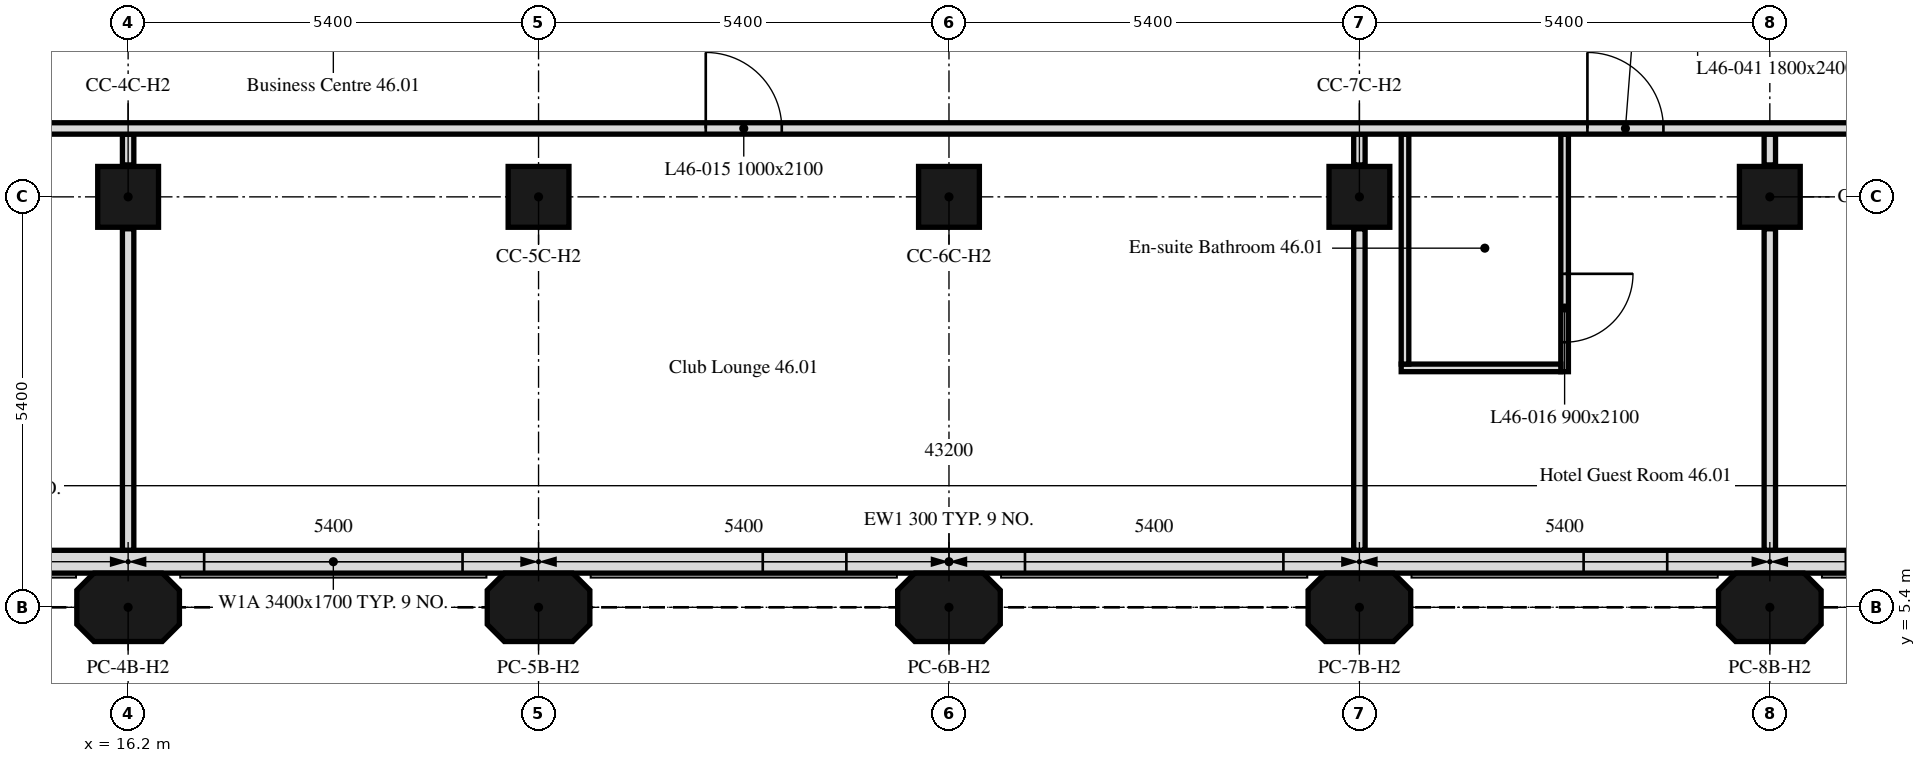
"""IFC4 building model, lengths in metres.
Left out: names, types, materials, properties, quantities, classifications, styles, units other than length and angle.
Written with IfcOpenShell. Run it as: python <this file> out.ifc"""

import sys

from ifc_helpers import new_model, si_unit, direction, frame, frame_2d, origin, origin_2d, place, context, subcontext, project, spatial, polyline, rectangle, outline, extrude, element, fill, save


model = new_model("IFC4")
c1 = context("Model", 3, precision=1e-05, world=origin(), true_north=direction((0.0, 1.0)))
c2 = subcontext(c1, "Body", "Model", "MODEL_VIEW")
j1 = project(units=[si_unit("LENGTHUNIT", "METRE"), si_unit("PLANEANGLEUNIT", "RADIAN")], contexts=[c1])
p1 = place(None, origin())
s1 = spatial("IfcSite", under=j1, at=p1, CompositionType="ELEMENT")
p2 = place(p1, origin())
s2 = spatial("IfcBuilding", under=s1, at=p2, CompositionType="ELEMENT")
p3 = place(p2, frame((0.0, 0.0, 190.6)))
s3 = spatial("IfcBuildingStorey", under=s2, at=p3, CompositionType="ELEMENT", Elevation=190.6)
for number, where, z_axis, x_axis in (
    (1, (16.2, 5.4, 0.0), (0.0, 0.0, 1.0), (1.0, 0.0, 0.0)),
    (2, (21.6, 5.4, 0.0), (0.0, 0.0, 1.0), (1.0, 0.0, 0.0)),
    (3, (27.0, 5.4, 0.0), (0.0, 0.0, 1.0), (1.0, 0.0, 0.0)),
    (4, (32.4, 5.4, 0.0), (0.0, 0.0, 1.0), (1.0, 0.0, 0.0)),
    (5, (37.8, 5.4, 0.0), (0.0, 0.0, 1.0), (1.0, 0.0, 0.0)),
):
    element("IfcColumn", number, at=place(p3, frame(where, z_axis=z_axis, x_axis=x_axis)), inside=s3, PredefinedType="COLUMN", context=c2, shape_type="SweptSolid", body=[
        extrude(outline(polyline([(-0.45, -0.45), (0.45, -0.45), (0.675, -0.225), (0.675, 0.225), (0.45, 0.45), (-0.45, 0.45), (-0.675, 0.225), (-0.675, -0.225), (-0.45, -0.45)])), origin(), (0.0, 0.0, 1.0), 3.0),
    ])
for number, where, z_axis, x_axis in (
    (6, (16.2, 10.8, 0.0), (0.0, 0.0, 1.0), (1.0, 0.0, 0.0)),
    (7, (21.6, 10.8, 0.0), (0.0, 0.0, 1.0), (1.0, 0.0, 0.0)),
    (8, (27.0, 10.8, 0.0), (0.0, 0.0, 1.0), (1.0, 0.0, 0.0)),
    (9, (32.4, 10.8, 0.0), (0.0, 0.0, 1.0), (1.0, 0.0, 0.0)),
    (10, (37.8, 10.8, 0.0), (0.0, 0.0, 1.0), (1.0, 0.0, 0.0)),
):
    element("IfcColumn", number, at=place(p3, frame(where, z_axis=z_axis, x_axis=x_axis)), inside=s3, PredefinedType="COLUMN", context=c2, shape_type="SweptSolid", body=[
        extrude(rectangle(XDim=0.8, YDim=0.8, at=origin_2d()), origin(), (0.0, 0.0, 1.0), 3.0),
    ])
p4 = place(p3, frame((10.986, 6.0, 0.0), z_axis=(0.0, 0.0, 1.0), x_axis=(1.0, 0.0, 0.0)))
e11 = element("IfcWall", 11, at=p4, inside=s3, PredefinedType="SOLIDWALL", context=c2, shape_type="SweptSolid", body=[
    extrude(rectangle(XDim=32.027, YDim=0.3, at=frame_2d((16.014, 0.0))), origin(), (0.0, 0.0, 1.0), 3.0),
])
p5 = place(p4, frame((2.764, 0.0, 0.9)))
e12 = element("IfcOpeningElement", 12, at=p5, cuts=e11, PredefinedType="OPENING", context=c2, shape_type="SweptSolid", body=[
    extrude(rectangle(XDim=1.1, YDim=1.7, at=frame_2d((0.55, 0.85))), frame((0.0, 0.16, 0.0), z_axis=(0.0, -1.0, 0.0), x_axis=(1.0, 0.0, 0.0)), (0.0, 0.0, 1.0), 0.32),
])
p6 = place(p4, frame((6.214, 0.0, 0.9)))
e13 = element("IfcOpeningElement", 13, at=p6, cuts=e11, PredefinedType="OPENING", context=c2, shape_type="SweptSolid", body=[
    extrude(rectangle(XDim=3.4, YDim=1.7, at=frame_2d((1.7, 0.85))), frame((0.0, 0.16, 0.0), z_axis=(0.0, -1.0, 0.0), x_axis=(1.0, 0.0, 0.0)), (0.0, 0.0, 1.0), 0.32),
])
p7 = place(p4, frame((13.564, 0.0, 0.9)))
e14 = element("IfcOpeningElement", 14, at=p7, cuts=e11, PredefinedType="OPENING", context=c2, shape_type="SweptSolid", body=[
    extrude(rectangle(XDim=1.1, YDim=1.7, at=frame_2d((0.55, 0.85))), frame((0.0, 0.16, 0.0), z_axis=(0.0, -1.0, 0.0), x_axis=(1.0, 0.0, 0.0)), (0.0, 0.0, 1.0), 0.32),
])
p8 = place(p4, frame((17.014, 0.0, 0.9)))
e15 = element("IfcOpeningElement", 15, at=p8, cuts=e11, PredefinedType="OPENING", context=c2, shape_type="SweptSolid", body=[
    extrude(rectangle(XDim=3.4, YDim=1.7, at=frame_2d((1.7, 0.85))), frame((0.0, 0.16, 0.0), z_axis=(0.0, -1.0, 0.0), x_axis=(1.0, 0.0, 0.0)), (0.0, 0.0, 1.0), 0.32),
])
p9 = place(p4, frame((24.364, 0.0, 0.9)))
e16 = element("IfcOpeningElement", 16, at=p9, cuts=e11, PredefinedType="OPENING", context=c2, shape_type="SweptSolid", body=[
    extrude(rectangle(XDim=1.1, YDim=1.7, at=frame_2d((0.55, 0.85))), frame((0.0, 0.16, 0.0), z_axis=(0.0, -1.0, 0.0), x_axis=(1.0, 0.0, 0.0)), (0.0, 0.0, 1.0), 0.32),
])
p10 = place(p4, frame((27.814, 0.0, 0.9)))
e17 = element("IfcOpeningElement", 17, at=p10, cuts=e11, PredefinedType="OPENING", context=c2, shape_type="SweptSolid", body=[
    extrude(rectangle(XDim=3.4, YDim=1.7, at=frame_2d((1.7, 0.85))), frame((0.0, 0.16, 0.0), z_axis=(0.0, -1.0, 0.0), x_axis=(1.0, 0.0, 0.0)), (0.0, 0.0, 1.0), 0.32),
])
p11 = place(p3, frame((16.2, 6.151, 0.0), z_axis=(0.0, 0.0, 1.0), x_axis=(0.0, 1.0, 0.0)))
e18 = element("IfcWall", 18, at=p11, inside=s3, PredefinedType="PARTITIONING", context=c2, shape_type="SweptSolid", body=[
    extrude(rectangle(XDim=4.229, YDim=0.15, at=frame_2d((2.115, 0.0))), origin(), (0.0, 0.0, 1.0), 3.0),
])
p12 = place(p3, frame((16.2, 11.22, 0.0), z_axis=(0.0, 0.0, 1.0), x_axis=(0.0, 1.0, 0.0)))
e19 = element("IfcWall", 19, at=p12, inside=s3, PredefinedType="PARTITIONING", context=c2, shape_type="SweptSolid", body=[
    extrude(rectangle(XDim=0.405, YDim=0.15, at=frame_2d((0.203, 0.0))), origin(), (0.0, 0.0, 1.0), 3.0),
])
p13 = place(p3, frame((32.4, 6.151, 0.0), z_axis=(0.0, 0.0, 1.0), x_axis=(0.0, 1.0, 0.0)))
e20 = element("IfcWall", 20, at=p13, inside=s3, PredefinedType="PARTITIONING", context=c2, shape_type="SweptSolid", body=[
    extrude(rectangle(XDim=4.229, YDim=0.15, at=frame_2d((2.115, 0.0))), origin(), (0.0, 0.0, 1.0), 3.0),
])
p14 = place(p3, frame((32.4, 11.22, 0.0), z_axis=(0.0, 0.0, 1.0), x_axis=(0.0, 1.0, 0.0)))
e21 = element("IfcWall", 21, at=p14, inside=s3, PredefinedType="PARTITIONING", context=c2, shape_type="SweptSolid", body=[
    extrude(rectangle(XDim=0.405, YDim=0.15, at=frame_2d((0.203, 0.0))), origin(), (0.0, 0.0, 1.0), 3.0),
])
p15 = place(p3, frame((37.8, 6.151, 0.0), z_axis=(0.0, 0.0, 1.0), x_axis=(0.0, 1.0, 0.0)))
e22 = element("IfcWall", 22, at=p15, inside=s3, PredefinedType="PARTITIONING", context=c2, shape_type="SweptSolid", body=[
    extrude(rectangle(XDim=4.229, YDim=0.15, at=frame_2d((2.115, 0.0))), origin(), (0.0, 0.0, 1.0), 3.0),
])
p16 = place(p3, frame((37.8, 11.22, 0.0), z_axis=(0.0, 0.0, 1.0), x_axis=(0.0, 1.0, 0.0)))
e23 = element("IfcWall", 23, at=p16, inside=s3, PredefinedType="PARTITIONING", context=c2, shape_type="SweptSolid", body=[
    extrude(rectangle(XDim=0.405, YDim=0.15, at=frame_2d((0.203, 0.0))), origin(), (0.0, 0.0, 1.0), 3.0),
])
p17 = place(p3, frame((35.1, 11.625, 0.0), z_axis=(0.0, 0.0, 1.0), x_axis=(0.0, -1.0, 0.0)))
e24 = element("IfcWall", 24, at=p17, inside=s3, PredefinedType="PARTITIONING", context=c2, shape_type="SweptSolid", body=[
    extrude(rectangle(XDim=3.125, YDim=0.1, at=frame_2d((1.562, 0.0))), origin(), (0.0, 0.0, 1.0), 3.0),
])
p18 = place(p17, frame((1.837, 0.0, 0.0)))
e25 = element("IfcOpeningElement", 25, at=p18, cuts=e24, PredefinedType="OPENING", context=c2, shape_type="SweptSolid", body=[
    extrude(rectangle(XDim=0.9, YDim=2.1, at=frame_2d((0.45, 1.05))), frame((0.0, 0.05, 0.0), z_axis=(0.0, -1.0, 0.0), x_axis=(1.0, 0.0, 0.0)), (0.0, 0.0, 1.0), 0.1),
])
p19 = place(p3, frame((35.05, 8.55, 0.0), z_axis=(0.0, 0.0, 1.0), x_axis=(-1.0, 0.0, 0.0)))
e26 = element("IfcWall", 26, at=p19, inside=s3, PredefinedType="PARTITIONING", context=c2, shape_type="SweptSolid", body=[
    extrude(rectangle(XDim=2.1, YDim=0.1, at=frame_2d((1.05, 0.0))), origin(), (0.0, 0.0, 1.0), 3.0),
])
p20 = place(p3, frame((33.0, 8.6, 0.0), z_axis=(0.0, 0.0, 1.0), x_axis=(0.0, 1.0, 0.0)))
e27 = element("IfcWall", 27, at=p20, inside=s3, PredefinedType="PARTITIONING", context=c2, shape_type="SweptSolid", body=[
    extrude(rectangle(XDim=3.025, YDim=0.1, at=frame_2d((1.512, 0.0))), origin(), (0.0, 0.0, 1.0), 3.0),
])
p21 = place(p3, frame((6.151, 11.7, 0.0), z_axis=(0.0, 0.0, 1.0), x_axis=(1.0, 0.0, 0.0)))
e28 = element("IfcWall", 28, at=p21, inside=s3, PredefinedType="PARTITIONING", context=c2, shape_type="SweptSolid", body=[
    extrude(rectangle(XDim=41.698, YDim=0.15, at=frame_2d((20.849, 0.0))), origin(), (0.0, 0.0, 1.0), 3.0),
])
p22 = place(p21, frame((17.649, 0.0, 0.0)))
e29 = element("IfcOpeningElement", 29, at=p22, cuts=e28, PredefinedType="OPENING", context=c2, shape_type="SweptSolid", body=[
    extrude(rectangle(XDim=1.0, YDim=2.1, at=frame_2d((0.5, 1.05))), frame((0.0, 0.075, 0.0), z_axis=(0.0, -1.0, 0.0), x_axis=(1.0, 0.0, 0.0)), (0.0, 0.0, 1.0), 0.15),
])
p23 = place(p21, frame((1.449, 0.0, 0.0)))
e30 = element("IfcOpeningElement", 30, at=p23, cuts=e28, PredefinedType="OPENING", context=c2, shape_type="SweptSolid", body=[
    extrude(rectangle(XDim=1.0, YDim=2.1, at=frame_2d((0.5, 1.05))), frame((0.0, 0.075, 0.0), z_axis=(0.0, -1.0, 0.0), x_axis=(1.0, 0.0, 0.0)), (0.0, 0.0, 1.0), 0.15),
])
p24 = place(p21, frame((29.249, 0.0, 0.0)))
e31 = element("IfcOpeningElement", 31, at=p24, cuts=e28, PredefinedType="OPENING", context=c2, shape_type="SweptSolid", body=[
    extrude(rectangle(XDim=1.0, YDim=2.1, at=frame_2d((0.5, 1.05))), frame((0.0, 0.075, 0.0), z_axis=(0.0, -1.0, 0.0), x_axis=(1.0, 0.0, 0.0)), (0.0, 0.0, 1.0), 0.15),
])
p25 = place(p21, frame((37.954, 0.0, 0.0)))
e32 = element("IfcOpeningElement", 32, at=p25, cuts=e28, PredefinedType="OPENING", context=c2, shape_type="SweptSolid", body=[
    extrude(rectangle(XDim=1.0, YDim=2.1, at=frame_2d((0.5, 1.05))), frame((0.0, 0.075, 0.0), z_axis=(0.0, -1.0, 0.0), x_axis=(1.0, 0.0, 0.0)), (0.0, 0.0, 1.0), 0.15),
])
p26 = place(p6, origin())
e33 = element("IfcWindow", 33, at=p26, inside=s3, PartitioningType="SINGLE_PANEL", PredefinedType="WINDOW", context=c2, shape_type="SweptSolid", body=[
    extrude(rectangle(XDim=3.4, YDim=1.7, at=frame_2d((1.7, 0.85))), frame((0.0, 0.03, 0.0), z_axis=(0.0, -1.0, 0.0), x_axis=(1.0, 0.0, 0.0)), (0.0, 0.0, 1.0), 0.06),
])
fill(e13, e33)
p27 = place(p7, origin())
e34 = element("IfcWindow", 34, at=p27, inside=s3, PartitioningType="SINGLE_PANEL", PredefinedType="WINDOW", context=c2, shape_type="SweptSolid", body=[
    extrude(rectangle(XDim=1.1, YDim=1.7, at=frame_2d((0.55, 0.85))), frame((0.0, 0.03, 0.0), z_axis=(0.0, -1.0, 0.0), x_axis=(1.0, 0.0, 0.0)), (0.0, 0.0, 1.0), 0.06),
])
fill(e14, e34)
p28 = place(p8, origin())
e35 = element("IfcWindow", 35, at=p28, inside=s3, PartitioningType="SINGLE_PANEL", PredefinedType="WINDOW", context=c2, shape_type="SweptSolid", body=[
    extrude(rectangle(XDim=3.4, YDim=1.7, at=frame_2d((1.7, 0.85))), frame((0.0, 0.03, 0.0), z_axis=(0.0, -1.0, 0.0), x_axis=(1.0, 0.0, 0.0)), (0.0, 0.0, 1.0), 0.06),
])
fill(e15, e35)
p29 = place(p9, origin())
e36 = element("IfcWindow", 36, at=p29, inside=s3, PartitioningType="SINGLE_PANEL", PredefinedType="WINDOW", context=c2, shape_type="SweptSolid", body=[
    extrude(rectangle(XDim=1.1, YDim=1.7, at=frame_2d((0.55, 0.85))), frame((0.0, 0.03, 0.0), z_axis=(0.0, -1.0, 0.0), x_axis=(1.0, 0.0, 0.0)), (0.0, 0.0, 1.0), 0.06),
])
fill(e16, e36)
p30 = place(p22, origin())
e37 = element("IfcDoor", 37, at=p30, inside=s3, OperationType="SINGLE_SWING_LEFT", PredefinedType="DOOR", context=c2, shape_type="SweptSolid", body=[
    extrude(rectangle(XDim=1.0, YDim=2.1, at=frame_2d((0.5, 1.05))), frame((0.0, 0.025, 0.0), z_axis=(0.0, -1.0, 0.0), x_axis=(1.0, 0.0, 0.0)), (0.0, 0.0, 1.0), 0.05),
])
fill(e29, e37)
p31 = place(p18, origin())
e38 = element("IfcDoor", 38, at=p31, inside=s3, OperationType="SINGLE_SWING_RIGHT", PredefinedType="DOOR", context=c2, shape_type="SweptSolid", body=[
    extrude(rectangle(XDim=0.9, YDim=2.1, at=frame_2d((0.45, 1.05))), frame((0.0, 0.025, 0.0), z_axis=(0.0, -1.0, 0.0), x_axis=(1.0, 0.0, 0.0)), (0.0, 0.0, 1.0), 0.05),
])
fill(e25, e38)
p32 = place(p24, origin())
e39 = element("IfcDoor", 39, at=p32, inside=s3, OperationType="SINGLE_SWING_RIGHT", PredefinedType="DOOR", context=c2, shape_type="SweptSolid", body=[
    extrude(rectangle(XDim=1.0, YDim=2.1, at=frame_2d((0.5, 1.05))), frame((0.0, 0.025, 0.0), z_axis=(0.0, -1.0, 0.0), x_axis=(1.0, 0.0, 0.0)), (0.0, 0.0, 1.0), 0.05),
])
fill(e31, e39)
save(model, sys.argv[1])
